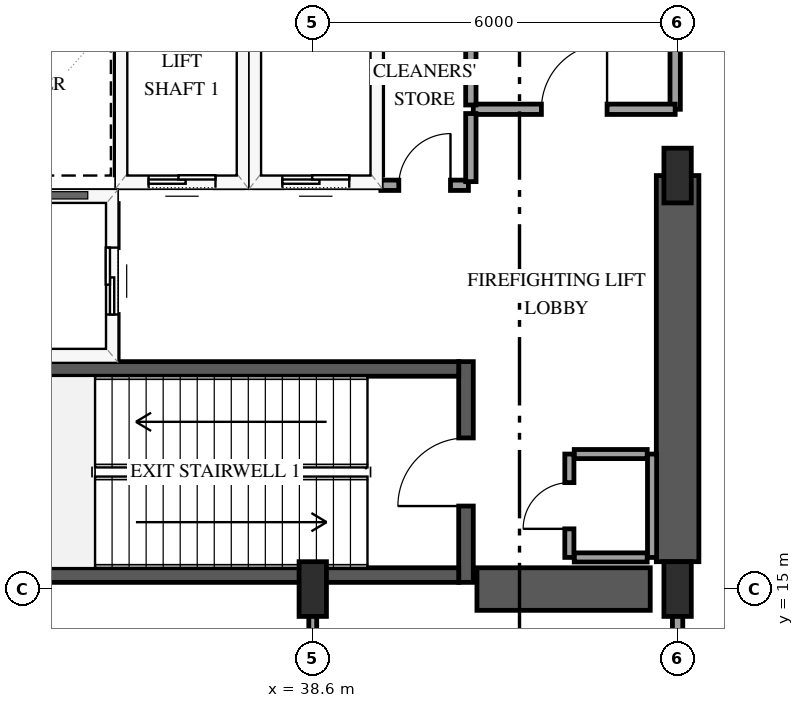
"""IFC4 building model, lengths in metres.
Left out: names, types, materials, properties, quantities, classifications, styles, units other than length and angle.
Written with IfcOpenShell. Run it as: python <this file> out.ifc"""

import sys

from ifc_helpers import new_model, si_unit, direction, frame, frame_2d, origin, origin_2d, place, context, subcontext, project, spatial, rectangle, extrude, element, fill, save


model = new_model("IFC4")
c1 = context("Model", 3, precision=1e-05, world=origin(), true_north=direction((0.0, 1.0)))
c2 = subcontext(c1, "Body", "Model", "MODEL_VIEW")
j1 = project(units=[si_unit("LENGTHUNIT", "METRE"), si_unit("PLANEANGLEUNIT", "RADIAN")], contexts=[c1])
p1 = place(None, origin())
s1 = spatial("IfcSite", under=j1, at=p1, CompositionType="ELEMENT")
p2 = place(p1, origin())
s2 = spatial("IfcBuilding", under=s1, at=p2, CompositionType="ELEMENT")
p3 = place(p2, origin())
s3 = spatial("IfcBuildingStorey", under=s2, at=p3, CompositionType="ELEMENT", Elevation=0.0)
p4 = place(p3, frame((41.12, 15.11, 0.0), z_axis=(0.0, 0.0, 1.0), x_axis=(0.0, 1.0, 0.0)))
e1 = element("IfcWall", 1, at=p4, inside=s3, PredefinedType="SHEAR", context=c2, shape_type="SweptSolid", body=[
    extrude(rectangle(XDim=3.63, YDim=0.24, at=frame_2d((1.815, 0.0))), origin(), (0.0, 0.0, 1.0), 6.0),
])
p5 = place(p4, frame((1.255, 0.0, 0.0)))
e2 = element("IfcOpeningElement", 2, at=p5, cuts=e1, PredefinedType="OPENING", context=c2, shape_type="SweptSolid", body=[
    extrude(rectangle(XDim=1.12, YDim=2.15, at=frame_2d((0.56, 1.075))), frame((0.0, 0.13, 0.0), z_axis=(0.0, -1.0, 0.0), x_axis=(1.0, 0.0, 0.0)), (0.0, 0.0, 1.0), 0.26),
])
for number, where, z_axis, x_axis in (
    (3, (33.0, 15.23, 0.0), (0.0, 0.0, 1.0), (1.0, 0.0, 0.0)),
    (4, (33.0, 18.62, 0.0), (0.0, 0.0, 1.0), (1.0, 0.0, 0.0)),
):
    element("IfcWall", number, at=place(p3, frame(where, z_axis=z_axis, x_axis=x_axis)), inside=s3, PredefinedType="SHEAR", context=c2, shape_type="SweptSolid", body=[
        extrude(rectangle(XDim=8.0, YDim=0.24, at=frame_2d((4.0, 0.0))), origin(), (0.0, 0.0, 1.0), 6.0),
    ])
p6 = place(p3, frame((41.3, 15.0, 0.0), z_axis=(0.0, 0.0, 1.0), x_axis=(1.0, 0.0, 0.0)))
e5 = element("IfcWall", 5, at=p6, inside=s3, PredefinedType="SHEAR", context=c2, shape_type="SweptSolid", body=[
    extrude(rectangle(XDim=2.85, YDim=0.7, at=frame_2d((1.425, 0.0))), origin(), (0.0, 0.0, 1.0), 6.0),
])
p7 = place(p3, frame((44.6, 15.45, 0.0), z_axis=(0.0, 0.0, 1.0), x_axis=(0.0, 1.0, 0.0)))
e6 = element("IfcWall", 6, at=p7, inside=s3, PredefinedType="SHEAR", context=c2, shape_type="SweptSolid", body=[
    extrude(rectangle(XDim=6.35, YDim=0.7, at=frame_2d((3.175, 0.0))), origin(), (0.0, 0.0, 1.0), 6.0),
])
for number, where, z_axis, x_axis in (
    (7, (38.6, 15.0, 0.0), (0.0, 0.0, 1.0), (1.0, 0.0, 0.0)),
    (8, (44.6, 15.0, 0.0), (0.0, 0.0, 1.0), (1.0, 0.0, 0.0)),
    (9, (44.6, 21.8, 0.0), (0.0, 0.0, 1.0), (1.0, 0.0, 0.0)),
):
    element("IfcColumn", number, at=place(p3, frame(where, z_axis=z_axis, x_axis=x_axis)), inside=s3, PredefinedType="PILASTER", context=c2, shape_type="SweptSolid", body=[
        extrude(rectangle(XDim=0.45, YDim=0.9, at=origin_2d()), origin(), (0.0, 0.0, 1.0), 6.0),
    ])
p8 = place(p3, frame((35.45, 21.7, 0.0), z_axis=(0.0, 0.0, 1.0), x_axis=(1.0, 0.0, 0.0)))
e10 = element("IfcWall", 10, at=p8, inside=s3, PredefinedType="SOLIDWALL", context=c2, shape_type="SweptSolid", body=[
    extrude(rectangle(XDim=2.0, YDim=0.2, at=frame_2d((1.0, 0.0))), origin(), (0.0, 0.0, 1.0), 5.68),
])
p9 = place(p8, frame((0.45, 0.0, 0.0)))
e11 = element("IfcOpeningElement", 11, at=p9, cuts=e10, PredefinedType="OPENING", context=c2, shape_type="SweptSolid", body=[
    extrude(rectangle(XDim=1.1, YDim=2.15, at=frame_2d((0.55, 1.075))), frame((0.0, 0.11, 0.0), z_axis=(0.0, -1.0, 0.0), x_axis=(1.0, 0.0, 0.0)), (0.0, 0.0, 1.0), 0.22),
])
for number, where, z_axis, x_axis in (
    (12, (35.45, 21.81, 0.0), (0.0, 0.0, 1.0), (0.0, 1.0, 0.0)),
    (13, (37.45, 21.81, 0.0), (0.0, 0.0, 1.0), (0.0, 1.0, 0.0)),
):
    element("IfcWall", number, at=place(p3, frame(where, z_axis=z_axis, x_axis=x_axis)), inside=s3, PredefinedType="SOLIDWALL", context=c2, shape_type="SweptSolid", body=[
        extrude(rectangle(XDim=2.38, YDim=0.2, at=frame_2d((1.19, 0.0))), origin(), (0.0, 0.0, 1.0), 5.68),
    ])
p10 = place(p3, frame((37.65, 21.7, 0.0), z_axis=(0.0, 0.0, 1.0), x_axis=(1.0, 0.0, 0.0)))
e14 = element("IfcWall", 14, at=p10, inside=s3, PredefinedType="SOLIDWALL", context=c2, shape_type="SweptSolid", body=[
    extrude(rectangle(XDim=2.0, YDim=0.2, at=frame_2d((1.0, 0.0))), origin(), (0.0, 0.0, 1.0), 5.68),
])
p11 = place(p10, frame((0.45, 0.0, 0.0)))
e15 = element("IfcOpeningElement", 15, at=p11, cuts=e14, PredefinedType="OPENING", context=c2, shape_type="SweptSolid", body=[
    extrude(rectangle(XDim=1.1, YDim=2.15, at=frame_2d((0.55, 1.075))), frame((0.0, 0.11, 0.0), z_axis=(0.0, -1.0, 0.0), x_axis=(1.0, 0.0, 0.0)), (0.0, 0.0, 1.0), 0.22),
])
p12 = place(p3, frame((39.65, 21.81, 0.0), z_axis=(0.0, 0.0, 1.0), x_axis=(0.0, 1.0, 0.0)))
e16 = element("IfcWall", 16, at=p12, inside=s3, PredefinedType="SOLIDWALL", context=c2, shape_type="SweptSolid", body=[
    extrude(rectangle(XDim=2.38, YDim=0.2, at=frame_2d((1.19, 0.0))), origin(), (0.0, 0.0, 1.0), 5.68),
])
p13 = place(p3, frame((32.72, 21.45, 0.0), z_axis=(0.0, 0.0, 1.0), x_axis=(1.0, 0.0, 0.0)))
e17 = element("IfcWall", 17, at=p13, inside=s3, PredefinedType="SOLIDWALL", context=c2, shape_type="SweptSolid", body=[
    extrude(rectangle(XDim=2.58, YDim=0.2, at=frame_2d((1.29, 0.0))), origin(), (0.0, 0.0, 1.0), 5.68),
])
p14 = place(p3, frame((35.3, 18.79, 0.0), z_axis=(0.0, 0.0, 1.0), x_axis=(0.0, 1.0, 0.0)))
e18 = element("IfcWall", 18, at=p14, inside=s3, PredefinedType="SOLIDWALL", context=c2, shape_type="SweptSolid", body=[
    extrude(rectangle(XDim=2.55, YDim=0.2, at=frame_2d((1.275, 0.0))), origin(), (0.0, 0.0, 1.0), 5.68),
])
p15 = place(p14, frame((0.725, 0.0, 0.0)))
e19 = element("IfcOpeningElement", 19, at=p15, cuts=e18, PredefinedType="OPENING", context=c2, shape_type="SweptSolid", body=[
    extrude(rectangle(XDim=1.1, YDim=2.15, at=frame_2d((0.55, 1.075))), frame((0.0, 0.11, 0.0), z_axis=(0.0, -1.0, 0.0), x_axis=(1.0, 0.0, 0.0)), (0.0, 0.0, 1.0), 0.22),
])
for number, where, z_axis, x_axis in (
    (20, (42.9, 15.52, 0.0), (0.0, 0.0, 1.0), (1.0, 0.0, 0.0)),
    (21, (42.9, 17.22, 0.0), (0.0, 0.0, 1.0), (1.0, 0.0, 0.0)),
):
    element("IfcWall", number, at=place(p3, frame(where, z_axis=z_axis, x_axis=x_axis)), inside=s3, PredefinedType="PARTITIONING", context=c2, shape_type="SweptSolid", body=[
        extrude(rectangle(XDim=1.2, YDim=0.15, at=frame_2d((0.6, 0.0))), origin(), (0.0, 0.0, 1.0), 5.68),
    ])
p16 = place(p3, frame((44.18, 15.52, 0.0), z_axis=(0.0, 0.0, 1.0), x_axis=(0.0, 1.0, 0.0)))
e22 = element("IfcWall", 22, at=p16, inside=s3, PredefinedType="PARTITIONING", context=c2, shape_type="SweptSolid", body=[
    extrude(rectangle(XDim=1.7, YDim=0.15, at=frame_2d((0.85, 0.0))), origin(), (0.0, 0.0, 1.0), 5.68),
])
p17 = place(p3, frame((42.82, 15.52, 0.0), z_axis=(0.0, 0.0, 1.0), x_axis=(0.0, 1.0, 0.0)))
e23 = element("IfcWall", 23, at=p17, inside=s3, PredefinedType="PARTITIONING", context=c2, shape_type="SweptSolid", body=[
    extrude(rectangle(XDim=1.7, YDim=0.15, at=frame_2d((0.85, 0.0))), origin(), (0.0, 0.0, 1.0), 5.68),
])
p18 = place(p17, frame((0.47, 0.0, 0.0)))
e24 = element("IfcOpeningElement", 24, at=p18, cuts=e23, PredefinedType="OPENING", context=c2, shape_type="SweptSolid", body=[
    extrude(rectangle(XDim=0.76, YDim=2.0, at=frame_2d((0.38, 1.0))), frame((0.0, 0.085, 0.0), z_axis=(0.0, -1.0, 0.0), x_axis=(1.0, 0.0, 0.0)), (0.0, 0.0, 1.0), 0.17),
])
p19 = place(p3, frame((38.6, 7.07, 0.0), z_axis=(0.0, 0.0, 1.0), x_axis=(0.0, 1.0, 0.0)))
e25 = element("IfcWall", 25, at=p19, inside=s3, PredefinedType="PARTITIONING", context=c2, shape_type="SweptSolid", body=[
    extrude(rectangle(XDim=7.86, YDim=0.13, at=frame_2d((3.93, 0.0))), origin(), (0.0, 0.0, 1.0), 5.68),
])
p20 = place(p3, frame((44.56, 29.8, 0.0), z_axis=(0.0, 0.0, 1.0), x_axis=(0.0, -1.0, 0.0)))
e26 = element("IfcWall", 26, at=p20, inside=s3, PredefinedType="PARTITIONING", context=c2, shape_type="SweptSolid", body=[
    extrude(rectangle(XDim=6.91, YDim=0.17, at=frame_2d((3.455, 0.0))), origin(), (0.0, 0.0, 1.0), 4.72),
])
p21 = place(p20, frame((2.915, 0.0, 0.0)))
e27 = element("IfcOpeningElement", 27, at=p21, cuts=e26, PredefinedType="OPENING", context=c2, shape_type="SweptSolid", body=[
    extrude(rectangle(XDim=1.38, YDim=2.2, at=frame_2d((0.69, 1.1))), frame((0.0, 0.095, 0.0), z_axis=(0.0, -1.0, 0.0), x_axis=(1.0, 0.0, 0.0)), (0.0, 0.0, 1.0), 0.19),
])
p22 = place(p3, frame((41.24, 22.89, 0.0), z_axis=(0.0, 0.0, 1.0), x_axis=(1.0, 0.0, 0.0)))
e28 = element("IfcWall", 28, at=p22, inside=s3, PredefinedType="PARTITIONING", context=c2, shape_type="SweptSolid", body=[
    extrude(rectangle(XDim=3.32, YDim=0.17, at=frame_2d((1.66, 0.0))), origin(), (0.0, 0.0, 1.0), 5.68),
])
p23 = place(p22, frame((1.12, 0.0, 0.0)))
e29 = element("IfcOpeningElement", 29, at=p23, cuts=e28, PredefinedType="OPENING", context=c2, shape_type="SweptSolid", body=[
    extrude(rectangle(XDim=1.08, YDim=2.15, at=frame_2d((0.54, 1.075))), frame((0.0, 0.095, 0.0), z_axis=(0.0, -1.0, 0.0), x_axis=(1.0, 0.0, 0.0)), (0.0, 0.0, 1.0), 0.19),
])
p24 = place(p3, frame((44.6, 11.87, 0.0), z_axis=(0.0, 0.0, 1.0), x_axis=(0.0, 1.0, 0.0)))
e30 = element("IfcWall", 30, at=p24, inside=s3, PredefinedType="PARTITIONING", context=c2, shape_type="SweptSolid", body=[
    extrude(rectangle(XDim=3.06, YDim=0.17, at=frame_2d((1.53, 0.0))), origin(), (0.0, 0.0, 1.0), 4.802),
])
p25 = place(p3, frame((41.2, 22.96, 0.0), z_axis=(0.0, 0.0, 1.0), x_axis=(0.0, 1.0, 0.0)))
e31 = element("IfcWall", 31, at=p25, inside=s3, PredefinedType="PARTITIONING", context=c2, shape_type="SweptSolid", body=[
    extrude(rectangle(XDim=1.69, YDim=0.17, at=frame_2d((0.845, 0.0))), origin(), (0.0, 0.0, 1.0), 5.68),
])
p26 = place(p3, frame((39.72, 21.64, 0.0), z_axis=(0.0, 0.0, 1.0), x_axis=(1.0, 0.0, 0.0)))
e32 = element("IfcWall", 32, at=p26, inside=s3, PredefinedType="PARTITIONING", context=c2, shape_type="SweptSolid", body=[
    extrude(rectangle(XDim=1.44, YDim=0.17, at=frame_2d((0.72, 0.0))), origin(), (0.0, 0.0, 1.0), 5.68),
])
p27 = place(p26, frame((0.295, 0.0, 0.0)))
e33 = element("IfcOpeningElement", 33, at=p27, cuts=e32, PredefinedType="OPENING", context=c2, shape_type="SweptSolid", body=[
    extrude(rectangle(XDim=0.85, YDim=2.1, at=frame_2d((0.425, 1.05))), frame((0.0, 0.095, 0.0), z_axis=(0.0, -1.0, 0.0), x_axis=(1.0, 0.0, 0.0)), (0.0, 0.0, 1.0), 0.19),
])
p28 = place(p3, frame((41.2, 21.7, 0.0), z_axis=(0.0, 0.0, 1.0), x_axis=(0.0, 1.0, 0.0)))
e34 = element("IfcWall", 34, at=p28, inside=s3, PredefinedType="PARTITIONING", context=c2, shape_type="SweptSolid", body=[
    extrude(rectangle(XDim=1.12, YDim=0.17, at=frame_2d((0.56, 0.0))), origin(), (0.0, 0.0, 1.0), 5.68),
])
p29 = place(p9, origin())
e35 = element("IfcDoor", 35, at=p29, inside=s3, OperationType="SLIDING_TO_LEFT", PredefinedType="DOOR", context=c2, shape_type="SweptSolid", body=[
    extrude(rectangle(XDim=1.1, YDim=2.15, at=frame_2d((0.55, 1.075))), frame((0.0, 0.025, 0.0), z_axis=(0.0, -1.0, 0.0), x_axis=(1.0, 0.0, 0.0)), (0.0, 0.0, 1.0), 0.05),
])
fill(e11, e35)
p30 = place(p11, origin())
e36 = element("IfcDoor", 36, at=p30, inside=s3, OperationType="SLIDING_TO_LEFT", PredefinedType="DOOR", context=c2, shape_type="SweptSolid", body=[
    extrude(rectangle(XDim=1.1, YDim=2.15, at=frame_2d((0.55, 1.075))), frame((0.0, 0.025, 0.0), z_axis=(0.0, -1.0, 0.0), x_axis=(1.0, 0.0, 0.0)), (0.0, 0.0, 1.0), 0.05),
])
fill(e15, e36)
p31 = place(p15, origin())
e37 = element("IfcDoor", 37, at=p31, inside=s3, OperationType="SLIDING_TO_LEFT", PredefinedType="DOOR", context=c2, shape_type="SweptSolid", body=[
    extrude(rectangle(XDim=1.1, YDim=2.15, at=frame_2d((0.55, 1.075))), frame((0.0, 0.025, 0.0), z_axis=(0.0, -1.0, 0.0), x_axis=(1.0, 0.0, 0.0)), (0.0, 0.0, 1.0), 0.05),
])
fill(e19, e37)
p32 = place(p5, origin())
e38 = element("IfcDoor", 38, at=p32, inside=s3, OperationType="SINGLE_SWING_LEFT", PredefinedType="DOOR", context=c2, shape_type="SweptSolid", body=[
    extrude(rectangle(XDim=1.12, YDim=2.15, at=frame_2d((0.56, 1.075))), frame((0.0, 0.025, 0.0), z_axis=(0.0, -1.0, 0.0), x_axis=(1.0, 0.0, 0.0)), (0.0, 0.0, 1.0), 0.05),
])
fill(e2, e38)
p33 = place(p18, origin())
e39 = element("IfcDoor", 39, at=p33, inside=s3, OperationType="SINGLE_SWING_LEFT", PredefinedType="TRAPDOOR", context=c2, shape_type="SweptSolid", body=[
    extrude(rectangle(XDim=0.76, YDim=2.0, at=frame_2d((0.38, 1.0))), frame((0.0, 0.025, 0.0), z_axis=(0.0, -1.0, 0.0), x_axis=(1.0, 0.0, 0.0)), (0.0, 0.0, 1.0), 0.05),
])
fill(e24, e39)
p34 = place(p23, origin())
e40 = element("IfcDoor", 40, at=p34, inside=s3, OperationType="SINGLE_SWING_RIGHT", PredefinedType="DOOR", context=c2, shape_type="SweptSolid", body=[
    extrude(rectangle(XDim=1.08, YDim=2.15, at=frame_2d((0.54, 1.075))), frame((0.0, 0.025, 0.0), z_axis=(0.0, -1.0, 0.0), x_axis=(1.0, 0.0, 0.0)), (0.0, 0.0, 1.0), 0.05),
])
fill(e29, e40)
p35 = place(p27, origin())
e41 = element("IfcDoor", 41, at=p35, inside=s3, OperationType="SINGLE_SWING_RIGHT", PredefinedType="DOOR", context=c2, shape_type="SweptSolid", body=[
    extrude(rectangle(XDim=0.85, YDim=2.1, at=frame_2d((0.425, 1.05))), frame((0.0, 0.025, 0.0), z_axis=(0.0, -1.0, 0.0), x_axis=(1.0, 0.0, 0.0)), (0.0, 0.0, 1.0), 0.05),
])
fill(e33, e41)
save(model, sys.argv[1])
